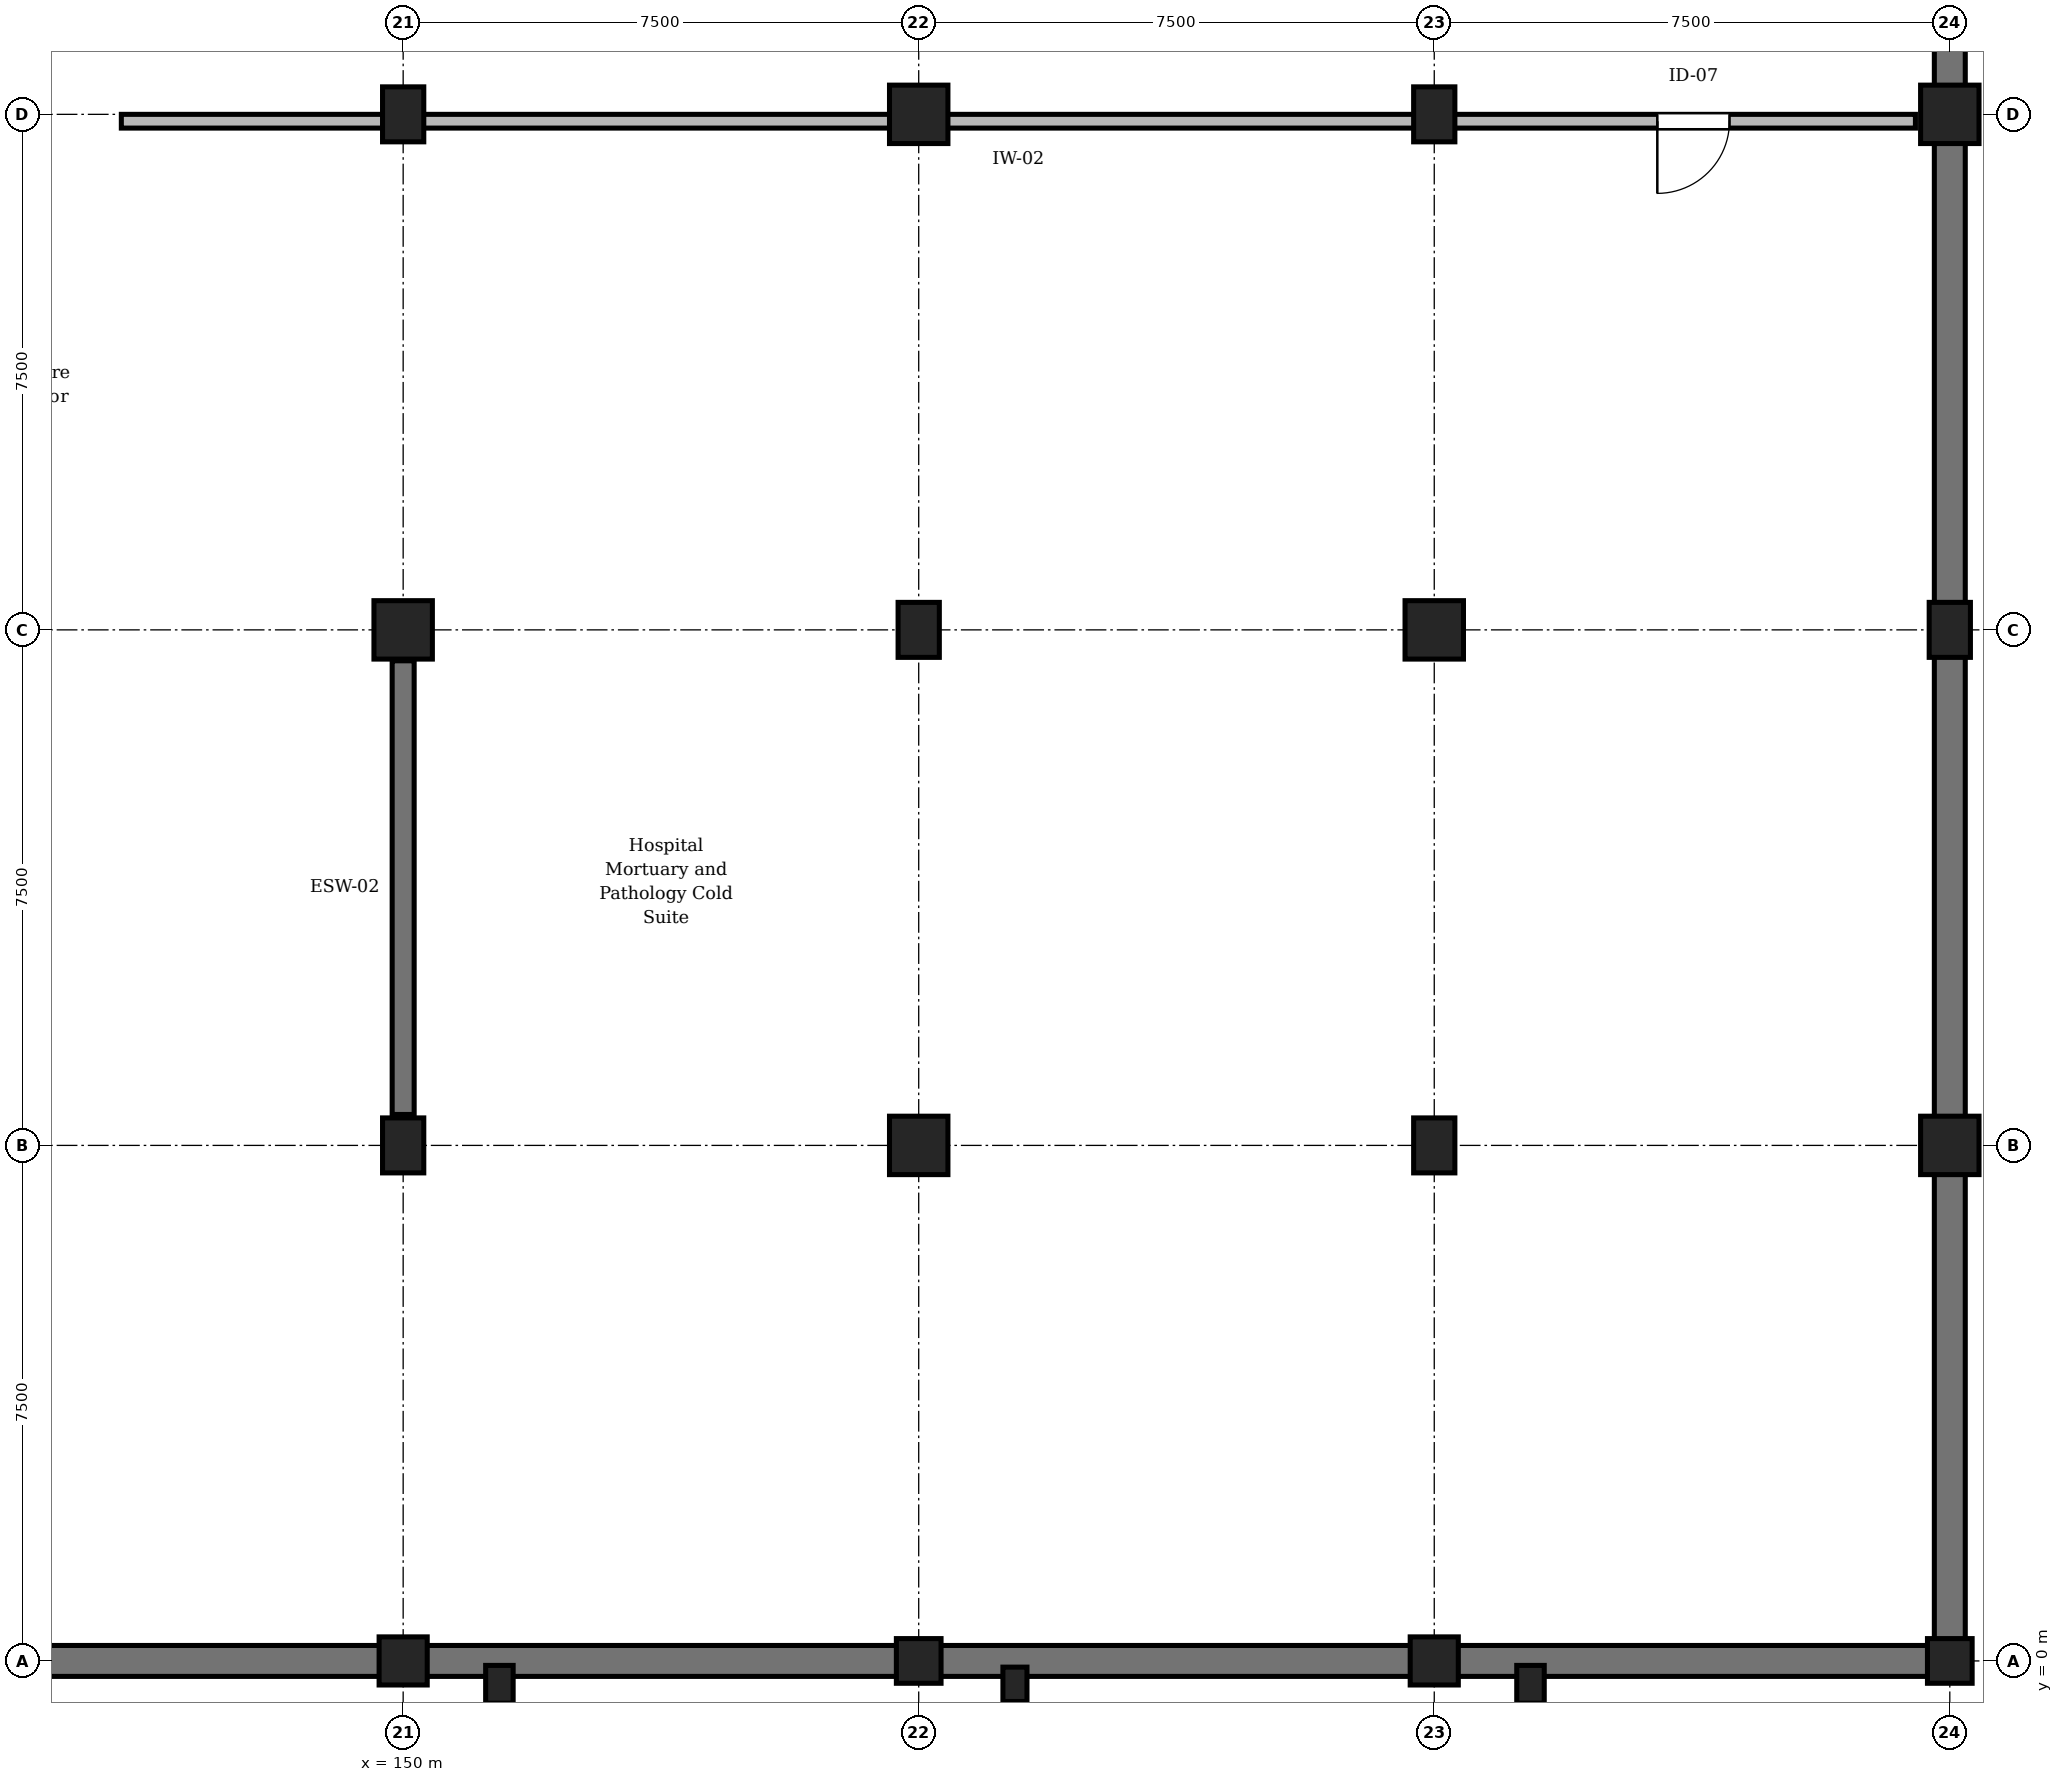
"""IFC4 building model, lengths in metres.
Left out: names, types, materials, properties, quantities, classifications, styles, units other than length and angle.
Written with IfcOpenShell. Run it as: python <this file> out.ifc"""

import sys

from ifc_helpers import new_model, si_unit, direction, frame, frame_2d, origin, origin_2d, place, context, subcontext, project, spatial, rectangle, extrude, element, fill, save


model = new_model("IFC4")
c1 = context("Model", 3, precision=1e-05, world=origin(), true_north=direction((0.0, 1.0)))
c2 = subcontext(c1, "Body", "Model", "MODEL_VIEW")
j1 = project(units=[si_unit("LENGTHUNIT", "METRE"), si_unit("PLANEANGLEUNIT", "RADIAN")], contexts=[c1])
p1 = place(None, origin())
s1 = spatial("IfcSite", under=j1, at=p1, CompositionType="ELEMENT")
p2 = place(p1, origin())
s2 = spatial("IfcBuilding", under=s1, at=p2, CompositionType="ELEMENT")
p3 = place(p2, frame((0.0, 0.0, -4.5)))
s3 = spatial("IfcBuildingStorey", under=s2, at=p3, CompositionType="ELEMENT", Elevation=-4.5)
p4 = place(p3, frame((150.0, 0.0, 0.0), z_axis=(0.0, 0.0, 1.0), x_axis=(1.0, 0.0, 0.0)))
e1 = element("IfcColumn", 1, at=p4, inside=s3, PredefinedType="COLUMN", context=c2, shape_type="SweptSolid", body=[
    extrude(rectangle(XDim=0.7, YDim=0.7, at=origin_2d()), origin(), (0.0, 0.0, 1.0), 4.5),
])
p5 = place(p3, frame((150.0, 7.5, 0.0), z_axis=(0.0, 0.0, 1.0), x_axis=(1.0, 0.0, 0.0)))
e2 = element("IfcColumn", 2, at=p5, inside=s3, PredefinedType="COLUMN", context=c2, shape_type="SweptSolid", body=[
    extrude(rectangle(XDim=0.6, YDim=0.8, at=origin_2d()), origin(), (0.0, 0.0, 1.0), 4.5),
])
p6 = place(p3, frame((150.0, 15.0, 0.0), z_axis=(0.0, 0.0, 1.0), x_axis=(1.0, 0.0, 0.0)))
e3 = element("IfcColumn", 3, at=p6, inside=s3, PredefinedType="COLUMN", context=c2, shape_type="SweptSolid", body=[
    extrude(rectangle(XDim=0.85, YDim=0.85, at=origin_2d()), origin(), (0.0, 0.0, 1.0), 4.5),
])
p7 = place(p3, frame((150.0, 22.5, 0.0), z_axis=(0.0, 0.0, 1.0), x_axis=(1.0, 0.0, 0.0)))
e4 = element("IfcColumn", 4, at=p7, inside=s3, PredefinedType="COLUMN", context=c2, shape_type="SweptSolid", body=[
    extrude(rectangle(XDim=0.6, YDim=0.8, at=origin_2d()), origin(), (0.0, 0.0, 1.0), 4.5),
])
p8 = place(p3, frame((157.5, 0.0, 0.0), z_axis=(0.0, 0.0, 1.0), x_axis=(1.0, 0.0, 0.0)))
e5 = element("IfcColumn", 5, at=p8, inside=s3, PredefinedType="COLUMN", context=c2, shape_type="SweptSolid", body=[
    extrude(rectangle(XDim=0.65, YDim=0.65, at=origin_2d()), origin(), (0.0, 0.0, 1.0), 4.5),
])
p9 = place(p3, frame((157.5, 7.5, 0.0), z_axis=(0.0, 0.0, 1.0), x_axis=(1.0, 0.0, 0.0)))
e6 = element("IfcColumn", 6, at=p9, inside=s3, PredefinedType="COLUMN", context=c2, shape_type="SweptSolid", body=[
    extrude(rectangle(XDim=0.85, YDim=0.85, at=origin_2d()), origin(), (0.0, 0.0, 1.0), 4.5),
])
p10 = place(p3, frame((157.5, 15.0, 0.0), z_axis=(0.0, 0.0, 1.0), x_axis=(1.0, 0.0, 0.0)))
e7 = element("IfcColumn", 7, at=p10, inside=s3, PredefinedType="COLUMN", context=c2, shape_type="SweptSolid", body=[
    extrude(rectangle(XDim=0.6, YDim=0.8, at=origin_2d()), origin(), (0.0, 0.0, 1.0), 4.5),
])
p11 = place(p3, frame((157.5, 22.5, 0.0), z_axis=(0.0, 0.0, 1.0), x_axis=(1.0, 0.0, 0.0)))
e8 = element("IfcColumn", 8, at=p11, inside=s3, PredefinedType="COLUMN", context=c2, shape_type="SweptSolid", body=[
    extrude(rectangle(XDim=0.85, YDim=0.85, at=origin_2d()), origin(), (0.0, 0.0, 1.0), 4.5),
])
p12 = place(p3, frame((165.0, 0.0, 0.0), z_axis=(0.0, 0.0, 1.0), x_axis=(1.0, 0.0, 0.0)))
e9 = element("IfcColumn", 9, at=p12, inside=s3, PredefinedType="COLUMN", context=c2, shape_type="SweptSolid", body=[
    extrude(rectangle(XDim=0.7, YDim=0.7, at=origin_2d()), origin(), (0.0, 0.0, 1.0), 4.5),
])
p13 = place(p3, frame((165.0, 7.5, 0.0), z_axis=(0.0, 0.0, 1.0), x_axis=(1.0, 0.0, 0.0)))
e10 = element("IfcColumn", 10, at=p13, inside=s3, PredefinedType="COLUMN", context=c2, shape_type="SweptSolid", body=[
    extrude(rectangle(XDim=0.6, YDim=0.8, at=origin_2d()), origin(), (0.0, 0.0, 1.0), 4.5),
])
p14 = place(p3, frame((165.0, 15.0, 0.0), z_axis=(0.0, 0.0, 1.0), x_axis=(1.0, 0.0, 0.0)))
e11 = element("IfcColumn", 11, at=p14, inside=s3, PredefinedType="COLUMN", context=c2, shape_type="SweptSolid", body=[
    extrude(rectangle(XDim=0.85, YDim=0.85, at=origin_2d()), origin(), (0.0, 0.0, 1.0), 4.5),
])
p15 = place(p3, frame((165.0, 22.5, 0.0), z_axis=(0.0, 0.0, 1.0), x_axis=(1.0, 0.0, 0.0)))
e12 = element("IfcColumn", 12, at=p15, inside=s3, PredefinedType="COLUMN", context=c2, shape_type="SweptSolid", body=[
    extrude(rectangle(XDim=0.6, YDim=0.8, at=origin_2d()), origin(), (0.0, 0.0, 1.0), 4.5),
])
p16 = place(p3, frame((172.5, 0.0, 0.0), z_axis=(0.0, 0.0, 1.0), x_axis=(1.0, 0.0, 0.0)))
e13 = element("IfcColumn", 13, at=p16, inside=s3, PredefinedType="COLUMN", context=c2, shape_type="SweptSolid", body=[
    extrude(rectangle(XDim=0.65, YDim=0.65, at=origin_2d()), origin(), (0.0, 0.0, 1.0), 4.5),
])
p17 = place(p3, frame((172.5, 7.5, 0.0), z_axis=(0.0, 0.0, 1.0), x_axis=(1.0, 0.0, 0.0)))
e14 = element("IfcColumn", 14, at=p17, inside=s3, PredefinedType="COLUMN", context=c2, shape_type="SweptSolid", body=[
    extrude(rectangle(XDim=0.85, YDim=0.85, at=origin_2d()), origin(), (0.0, 0.0, 1.0), 4.5),
])
p18 = place(p3, frame((172.5, 15.0, 0.0), z_axis=(0.0, 0.0, 1.0), x_axis=(1.0, 0.0, 0.0)))
e15 = element("IfcColumn", 15, at=p18, inside=s3, PredefinedType="COLUMN", context=c2, shape_type="SweptSolid", body=[
    extrude(rectangle(XDim=0.6, YDim=0.8, at=origin_2d()), origin(), (0.0, 0.0, 1.0), 4.5),
])
p19 = place(p3, frame((172.5, 22.5, 0.0), z_axis=(0.0, 0.0, 1.0), x_axis=(1.0, 0.0, 0.0)))
e16 = element("IfcColumn", 16, at=p19, inside=s3, PredefinedType="COLUMN", context=c2, shape_type="SweptSolid", body=[
    extrude(rectangle(XDim=0.85, YDim=0.85, at=origin_2d()), origin(), (0.0, 0.0, 1.0), 4.5),
])
p20 = place(p3, frame((151.4, -0.34, 0.0), z_axis=(0.0, 0.0, 1.0), x_axis=(1.0, 0.0, 0.0)))
e17 = element("IfcColumn", 17, at=p20, inside=s3, PredefinedType="PILASTER", context=c2, shape_type="SweptSolid", body=[
    extrude(rectangle(XDim=0.4, YDim=0.55, at=origin_2d()), origin(), (0.0, 0.0, 1.0), 4.5),
])
p21 = place(p3, frame((158.9, -0.34, 0.0), z_axis=(0.0, 0.0, 1.0), x_axis=(1.0, 0.0, 0.0)))
e18 = element("IfcColumn", 18, at=p21, inside=s3, PredefinedType="PILASTER", context=c2, shape_type="SweptSolid", body=[
    extrude(rectangle(XDim=0.35, YDim=0.5, at=origin_2d()), origin(), (0.0, 0.0, 1.0), 4.5),
])
p22 = place(p3, frame((166.4, -0.34, 0.0), z_axis=(0.0, 0.0, 1.0), x_axis=(1.0, 0.0, 0.0)))
e19 = element("IfcColumn", 19, at=p22, inside=s3, PredefinedType="PILASTER", context=c2, shape_type="SweptSolid", body=[
    extrude(rectangle(XDim=0.4, YDim=0.55, at=origin_2d()), origin(), (0.0, 0.0, 1.0), 4.5),
])
p23 = place(p3, frame((172.5, 31.5, 0.0), z_axis=(0.0, 0.0, 1.0), x_axis=(0.0, -1.0, 0.0)))
e20 = element("IfcWall", 20, at=p23, inside=s3, PredefinedType="SOLIDWALL", context=c2, shape_type="SweptSolid", body=[
    extrude(rectangle(XDim=9.0, YDim=0.45, at=frame_2d((4.5, 0.0))), origin(), (0.0, 0.0, 1.0), 4.14),
])
for number, where, z_axis, x_axis in (
    (21, (172.5, 22.5, 0.0), (0.0, 0.0, 1.0), (0.0, -1.0, 0.0)),
    (22, (172.5, 15.0, 0.0), (0.0, 0.0, 1.0), (0.0, -1.0, 0.0)),
    (23, (172.5, 7.5, 0.0), (0.0, 0.0, 1.0), (0.0, -1.0, 0.0)),
    (24, (172.5, 0.0, 0.0), (0.0, 0.0, 1.0), (-1.0, 0.0, 0.0)),
    (25, (165.0, 0.0, 0.0), (0.0, 0.0, 1.0), (-1.0, 0.0, 0.0)),
    (26, (157.5, 0.0, 0.0), (0.0, 0.0, 1.0), (-1.0, 0.0, 0.0)),
    (27, (150.0, 0.0, 0.0), (0.0, 0.0, 1.0), (-1.0, 0.0, 0.0)),
):
    element("IfcWall", number, at=place(p3, frame(where, z_axis=z_axis, x_axis=x_axis)), inside=s3, PredefinedType="SOLIDWALL", context=c2, shape_type="SweptSolid", body=[
        extrude(rectangle(XDim=7.5, YDim=0.45, at=frame_2d((3.75, 0.0))), origin(), (0.0, 0.0, 1.0), 4.14),
    ])
p24 = place(p3, frame((150.0, 7.95, 0.0), z_axis=(0.0, 0.0, 1.0), x_axis=(0.0, 1.0, 0.0)))
e28 = element("IfcWall", 28, at=p24, inside=s3, PredefinedType="SHEAR", context=c2, shape_type="SweptSolid", body=[
    extrude(rectangle(XDim=6.6, YDim=0.32, at=frame_2d((3.3, 0.0))), origin(), (0.0, 0.0, 1.0), 3.59),
])
p25 = place(p3, frame((172.0, 22.4, 0.0), z_axis=(0.0, 0.0, 1.0), x_axis=(-1.0, 0.0, 0.0)))
e29 = element("IfcWall", 29, at=p25, inside=s3, PredefinedType="STANDARD", context=c2, shape_type="SweptSolid", body=[
    extrude(rectangle(XDim=26.1, YDim=0.2, at=frame_2d((13.05, 0.0))), origin(), (0.0, 0.0, 1.0), 3.475),
])
p26 = place(p25, frame((2.705, 0.0, 0.0)))
e30 = element("IfcOpeningElement", 30, at=p26, cuts=e29, PredefinedType="OPENING", context=c2, shape_type="SweptSolid", body=[
    extrude(rectangle(XDim=1.05, YDim=2.2, at=frame_2d((0.525, 1.1))), frame((0.0, 0.11, 0.0), z_axis=(0.0, -1.0, 0.0), x_axis=(1.0, 0.0, 0.0)), (0.0, 0.0, 1.0), 0.22),
])
p27 = place(p26, origin())
e31 = element("IfcDoor", 31, at=p27, inside=s3, OperationType="SINGLE_SWING_RIGHT", PredefinedType="DOOR", context=c2, shape_type="SweptSolid", body=[
    extrude(rectangle(XDim=1.05, YDim=2.2, at=frame_2d((0.525, 1.1))), frame((0.0, 0.025, 0.0), z_axis=(0.0, -1.0, 0.0), x_axis=(1.0, 0.0, 0.0)), (0.0, 0.0, 1.0), 0.05),
])
fill(e30, e31)
save(model, sys.argv[1])
